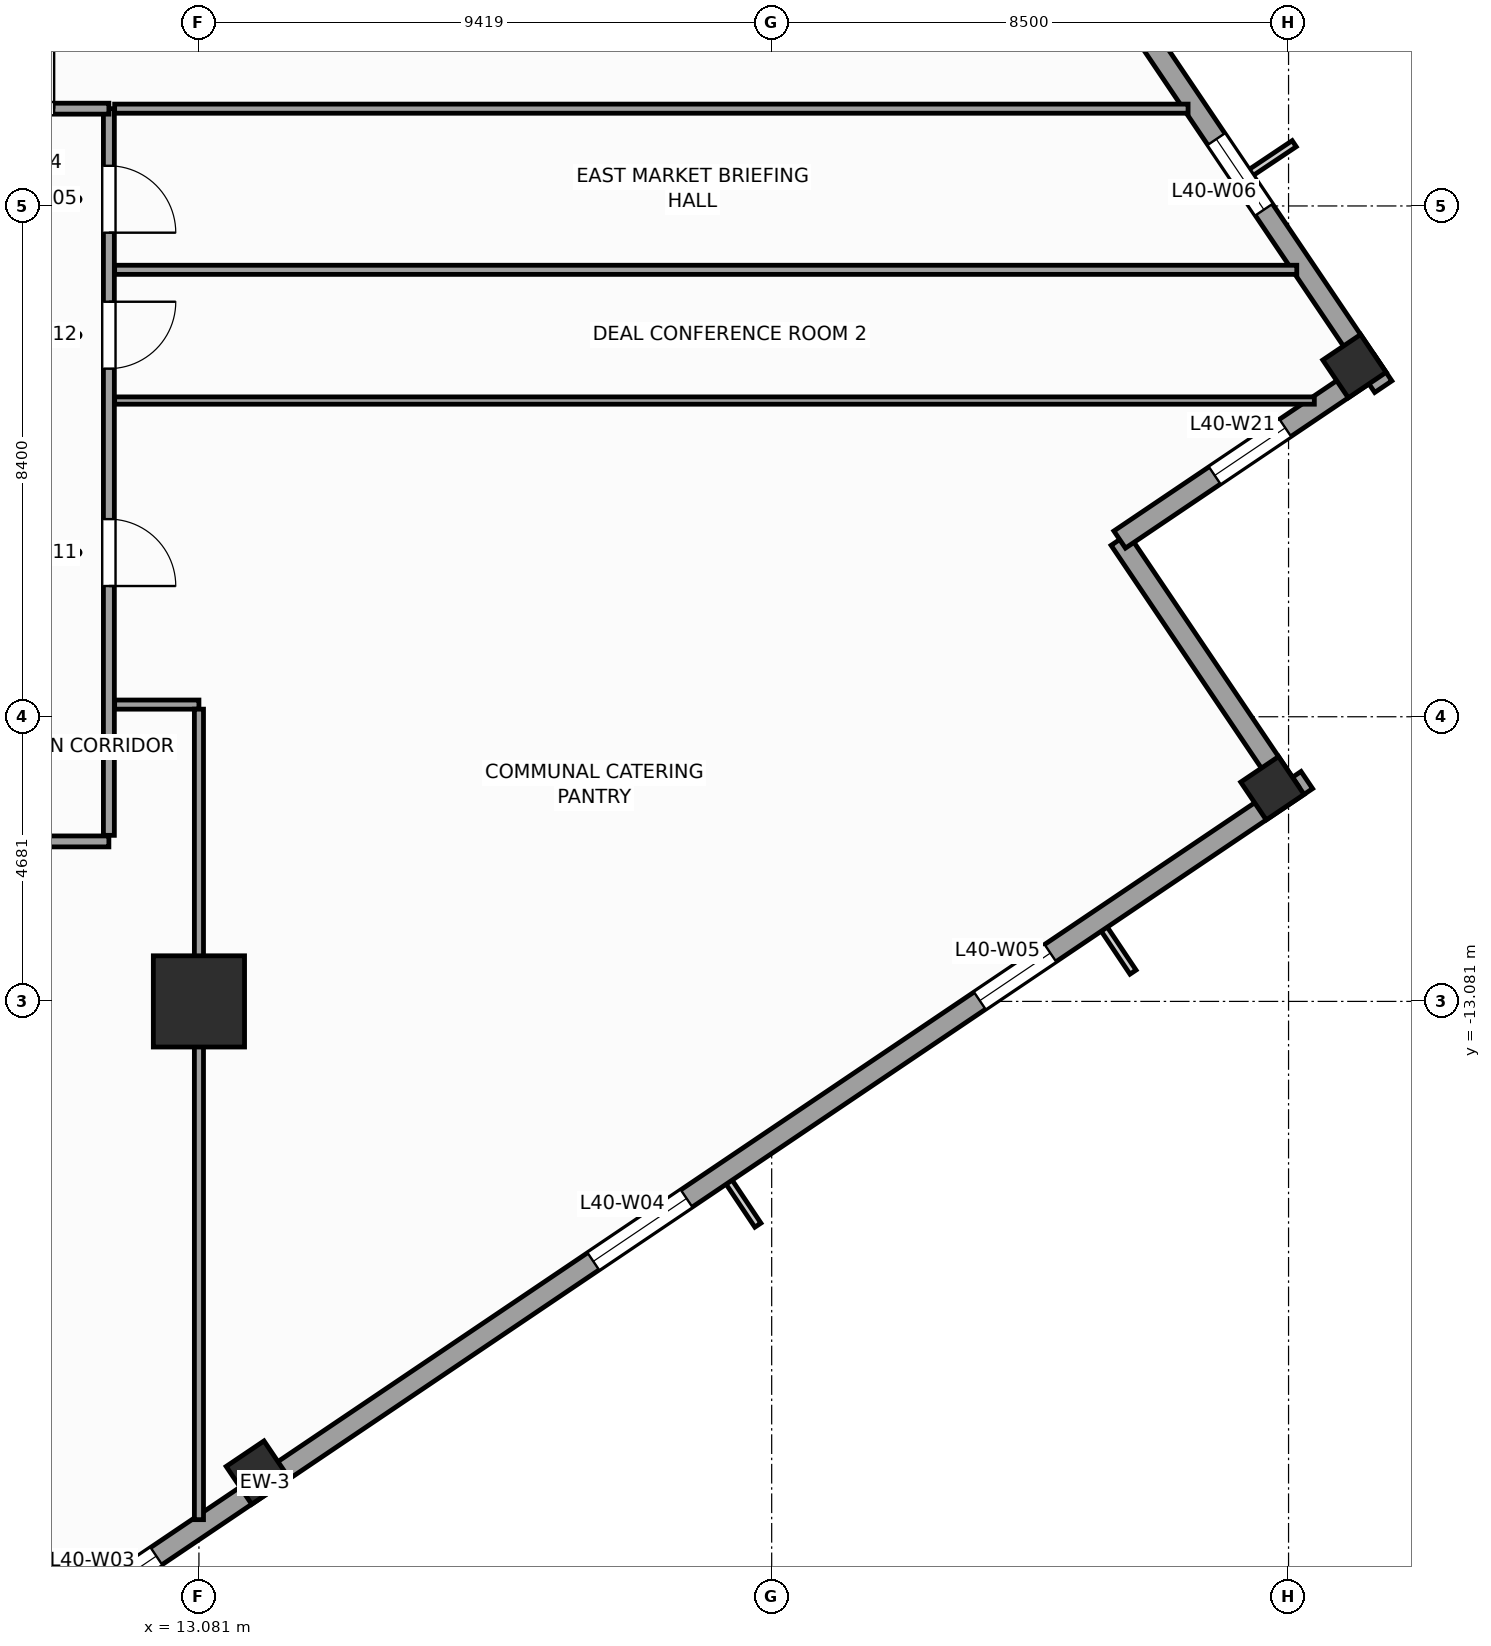
"""IFC4 building model, lengths in metres.
Left out: names, types, materials, properties, quantities, classifications, styles, units other than length and angle.
Written with IfcOpenShell. Run it as: python <this file> out.ifc"""

import sys

from ifc_helpers import new_model, si_unit, direction, frame, frame_2d, origin, origin_2d, place, context, subcontext, project, spatial, rectangle, extrude, source, transform, mapped, element, fill, save


model = new_model("IFC4")
c1 = context("Model", 3, precision=1e-05, world=origin(), true_north=direction((0.0, 1.0)))
c2 = subcontext(c1, "Body", "Model", "MODEL_VIEW")
j1 = project(units=[si_unit("LENGTHUNIT", "METRE"), si_unit("PLANEANGLEUNIT", "RADIAN")], contexts=[c1])
p1 = place(None, origin())
s1 = spatial("IfcSite", under=j1, at=p1, CompositionType="ELEMENT")
p2 = place(p1, origin())
s2 = spatial("IfcBuilding", under=s1, at=p2, CompositionType="ELEMENT")
p3 = place(p2, frame((0.0, 0.0, 168.4)))
s3 = spatial("IfcBuildingStorey", under=s2, at=p3, CompositionType="ELEMENT", Elevation=168.4)
m1 = source(origin(), c2, "Body", "SweptSolid", [
    extrude(rectangle(XDim=1.5, YDim=1.5, at=origin_2d()), origin(), (0.0, 0.0, 1.0), 4.0),
])
p4 = place(p3, frame((13.081, -13.081, 0.0), z_axis=(0.0, 0.0, 1.0), x_axis=(1.0, 0.0, 0.0)))
e1 = element("IfcColumn", 1, at=p4, inside=s3, PredefinedType="COLUMN", context=c2, shape_type="MappedRepresentation", body=[
    mapped(m1, transform((0.0, 0.0, 0.0), scale=1.0)),
])
m2 = source(origin(), c2, "Body", "SweptSolid", [
    extrude(rectangle(XDim=0.75, YDim=0.75, at=origin_2d()), origin(), (0.0, 0.0, 1.0), 4.0),
])
for number, where, z_axis, x_axis in (
    (2, (14.05, -20.83, 0.0), (0.0, 0.0, 1.0), (0.829, 0.559, 0.0)),
    (3, (30.734, -9.576, 0.0), (0.0, 0.0, 1.0), (0.829, 0.559, 0.0)),
    (4, (32.083, -2.635, 0.0), (0.0, 0.0, 1.0), (0.829, 0.559, 0.0)),
):
    element("IfcColumn", number, at=place(p3, frame(where, z_axis=z_axis, x_axis=x_axis)), inside=s3, PredefinedType="COLUMN", context=c2, shape_type="MappedRepresentation", body=[
        mapped(m2, transform((0.0, 0.0, 0.0), scale=1.0)),
    ])
p5 = place(p3, frame((-2.972, -32.558, 0.0), z_axis=(0.0, 0.0, 1.0), x_axis=(0.829036218961, 0.559194910251, 0.0)))
e5 = element("IfcWall", 5, at=p5, inside=s3, PredefinedType="STANDARD", context=c2, shape_type="SweptSolid", body=[
    extrude(rectangle(XDim=41.34, YDim=0.34, at=frame_2d((20.67, 0.0))), origin(), (0.0, 0.0, 1.0), 3.04),
])
p6 = place(p5, frame((4.261, 0.0, 0.56)))
e6 = element("IfcOpeningElement", 6, at=p6, cuts=e5, PredefinedType="OPENING", context=c2, shape_type="SweptSolid", body=[
    extrude(rectangle(XDim=1.4, YDim=2.4, at=frame_2d((0.7, 1.2))), frame((0.0, 0.18, 0.0), z_axis=(0.0, -1.0, 0.0), x_axis=(1.0, 0.0, 0.0)), (0.0, 0.0, 1.0), 0.36),
])
p7 = place(p5, frame((11.064, 0.0, 0.61)))
e7 = element("IfcOpeningElement", 7, at=p7, cuts=e5, PredefinedType="OPENING", context=c2, shape_type="SweptSolid", body=[
    extrude(rectangle(XDim=1.85, YDim=2.35, at=frame_2d((0.925, 1.175))), frame((0.0, 0.18, 0.0), z_axis=(0.0, -1.0, 0.0), x_axis=(1.0, 0.0, 0.0)), (0.0, 0.0, 1.0), 0.36),
])
p8 = place(p5, frame((16.668, 0.0, 0.61)))
e8 = element("IfcOpeningElement", 8, at=p8, cuts=e5, PredefinedType="OPENING", context=c2, shape_type="SweptSolid", body=[
    extrude(rectangle(XDim=1.85, YDim=2.35, at=frame_2d((0.925, 1.175))), frame((0.0, 0.18, 0.0), z_axis=(0.0, -1.0, 0.0), x_axis=(1.0, 0.0, 0.0)), (0.0, 0.0, 1.0), 0.36),
])
p9 = place(p5, frame((27.186, 0.0, 0.61)))
e9 = element("IfcOpeningElement", 9, at=p9, cuts=e5, PredefinedType="OPENING", context=c2, shape_type="SweptSolid", body=[
    extrude(rectangle(XDim=1.85, YDim=2.35, at=frame_2d((0.925, 1.175))), frame((0.0, 0.18, 0.0), z_axis=(0.0, -1.0, 0.0), x_axis=(1.0, 0.0, 0.0)), (0.0, 0.0, 1.0), 0.36),
])
p10 = place(p5, frame((34.852, 0.0, 0.56)))
e10 = element("IfcOpeningElement", 10, at=p10, cuts=e5, PredefinedType="OPENING", context=c2, shape_type="SweptSolid", body=[
    extrude(rectangle(XDim=1.4, YDim=2.4, at=frame_2d((0.7, 1.2))), frame((0.0, 0.18, 0.0), z_axis=(0.0, -1.0, 0.0), x_axis=(1.0, 0.0, 0.0)), (0.0, 0.0, 1.0), 0.36),
])
p11 = place(p3, frame((31.019, -9.631, 0.0), z_axis=(0.0, 0.0, 1.0), x_axis=(-0.559210350234, 0.829025804298, 0.0)))
e11 = element("IfcWall", 11, at=p11, inside=s3, PredefinedType="STANDARD", context=c2, shape_type="SweptSolid", body=[
    extrude(rectangle(XDim=5.0, YDim=0.34, at=frame_2d((2.5, 0.0))), origin(), (0.0, 0.0, 1.0), 3.74),
])
p12 = place(p3, frame((28.223, -5.486, 0.0), z_axis=(0.0, 0.0, 1.0), x_axis=(0.82905227345, 0.559171107879, 0.0)))
e12 = element("IfcWall", 12, at=p12, inside=s3, PredefinedType="STANDARD", context=c2, shape_type="SweptSolid", body=[
    extrude(rectangle(XDim=5.17, YDim=0.34, at=frame_2d((2.585, 0.0))), origin(), (0.0, 0.0, 1.0), 3.04),
])
p13 = place(p12, frame((1.885, 0.0, 0.56)))
e13 = element("IfcOpeningElement", 13, at=p13, cuts=e12, PredefinedType="OPENING", context=c2, shape_type="SweptSolid", body=[
    extrude(rectangle(XDim=1.4, YDim=2.4, at=frame_2d((0.7, 1.2))), frame((0.0, 0.18, 0.0), z_axis=(0.0, -1.0, 0.0), x_axis=(1.0, 0.0, 0.0)), (0.0, 0.0, 1.0), 0.36),
])
p14 = place(p3, frame((32.558, -2.972, 0.0), z_axis=(0.0, 0.0, 1.0), x_axis=(-0.559194910251, 0.829036218961, 0.0)))
e14 = element("IfcWall", 14, at=p14, inside=s3, PredefinedType="STANDARD", context=c2, shape_type="SweptSolid", body=[
    extrude(rectangle(XDim=41.34, YDim=0.34, at=frame_2d((20.67, 0.0))), origin(), (0.0, 0.0, 1.0), 3.04),
])
p15 = place(p14, frame((25.745, 0.0, 0.0)))
e15 = element("IfcOpeningElement", 15, at=p15, cuts=e14, PredefinedType="OPENING", context=c2, shape_type="SweptSolid", body=[
    extrude(rectangle(XDim=1.05, YDim=2.25, at=frame_2d((0.525, 1.125))), frame((0.0, 0.18, 0.0), z_axis=(0.0, -1.0, 0.0), x_axis=(1.0, 0.0, 0.0)), (0.0, 0.0, 1.0), 0.36),
])
p16 = place(p14, frame((3.511, 0.0, 0.56)))
e16 = element("IfcOpeningElement", 16, at=p16, cuts=e14, PredefinedType="OPENING", context=c2, shape_type="SweptSolid", body=[
    extrude(rectangle(XDim=1.4, YDim=2.4, at=frame_2d((0.7, 1.2))), frame((0.0, 0.18, 0.0), z_axis=(0.0, -1.0, 0.0), x_axis=(1.0, 0.0, 0.0)), (0.0, 0.0, 1.0), 0.36),
])
p17 = place(p14, frame((11.064, 0.0, 0.61)))
e17 = element("IfcOpeningElement", 17, at=p17, cuts=e14, PredefinedType="OPENING", context=c2, shape_type="SweptSolid", body=[
    extrude(rectangle(XDim=1.85, YDim=2.35, at=frame_2d((0.925, 1.175))), frame((0.0, 0.18, 0.0), z_axis=(0.0, -1.0, 0.0), x_axis=(1.0, 0.0, 0.0)), (0.0, 0.0, 1.0), 0.36),
])
p18 = place(p14, frame((18.168, 0.0, 0.61)))
e18 = element("IfcOpeningElement", 18, at=p18, cuts=e14, PredefinedType="OPENING", context=c2, shape_type="SweptSolid", body=[
    extrude(rectangle(XDim=1.85, YDim=2.35, at=frame_2d((0.925, 1.175))), frame((0.0, 0.18, 0.0), z_axis=(0.0, -1.0, 0.0), x_axis=(1.0, 0.0, 0.0)), (0.0, 0.0, 1.0), 0.36),
])
p19 = place(p14, frame((27.936, 0.0, 0.61)))
e19 = element("IfcOpeningElement", 19, at=p19, cuts=e14, PredefinedType="OPENING", context=c2, shape_type="SweptSolid", body=[
    extrude(rectangle(XDim=1.85, YDim=2.35, at=frame_2d((0.925, 1.175))), frame((0.0, 0.18, 0.0), z_axis=(0.0, -1.0, 0.0), x_axis=(1.0, 0.0, 0.0)), (0.0, 0.0, 1.0), 0.36),
])
p20 = place(p14, frame((34.852, 0.0, 0.56)))
e20 = element("IfcOpeningElement", 20, at=p20, cuts=e14, PredefinedType="OPENING", context=c2, shape_type="SweptSolid", body=[
    extrude(rectangle(XDim=1.4, YDim=2.4, at=frame_2d((0.7, 1.2))), frame((0.0, 0.18, 0.0), z_axis=(0.0, -1.0, 0.0), x_axis=(1.0, 0.0, 0.0)), (0.0, 0.0, 1.0), 0.36),
])
p21 = place(p3, frame((-10.45, -10.45, 0.0), z_axis=(0.0, 0.0, 1.0), x_axis=(1.0, 0.0, 0.0)))
e21 = element("IfcWall", 21, at=p21, inside=s3, PredefinedType="PARTITIONING", context=c2, shape_type="SweptSolid", body=[
    extrude(rectangle(XDim=22.05, YDim=0.18, at=frame_2d((11.025, 0.0))), origin(), (0.0, 0.0, 1.0), 3.74),
])
p22 = place(p21, frame((15.086, 0.0, 0.0)))
e22 = element("IfcOpeningElement", 22, at=p22, cuts=e21, PredefinedType="OPENING", context=c2, shape_type="SweptSolid", body=[
    extrude(rectangle(XDim=0.95, YDim=2.1, at=frame_2d((0.475, 1.05))), frame((0.0, 0.1, 0.0), z_axis=(0.0, -1.0, 0.0), x_axis=(1.0, 0.0, 0.0)), (0.0, 0.0, 1.0), 0.2),
])
p23 = place(p21, frame((7.611, 0.0, 0.0)))
e23 = element("IfcOpeningElement", 23, at=p23, cuts=e21, PredefinedType="OPENING", context=c2, shape_type="SweptSolid", body=[
    extrude(rectangle(XDim=0.95, YDim=2.1, at=frame_2d((0.475, 1.05))), frame((0.0, 0.1, 0.0), z_axis=(0.0, -1.0, 0.0), x_axis=(1.0, 0.0, 0.0)), (0.0, 0.0, 1.0), 0.2),
])
p24 = place(p21, frame((2.939, 0.0, 0.0)))
e24 = element("IfcOpeningElement", 24, at=p24, cuts=e21, PredefinedType="OPENING", context=c2, shape_type="SweptSolid", body=[
    extrude(rectangle(XDim=1.1, YDim=2.2, at=frame_2d((0.55, 1.1))), frame((0.0, 0.1, 0.0), z_axis=(0.0, -1.0, 0.0), x_axis=(1.0, 0.0, 0.0)), (0.0, 0.0, 1.0), 0.2),
])
p25 = place(p21, frame((11.175, 0.0, 0.0)))
e25 = element("IfcOpeningElement", 25, at=p25, cuts=e21, PredefinedType="OPENING", context=c2, shape_type="SweptSolid", body=[
    extrude(rectangle(XDim=1.1, YDim=2.2, at=frame_2d((0.55, 1.1))), frame((0.0, 0.1, 0.0), z_axis=(0.0, -1.0, 0.0), x_axis=(1.0, 0.0, 0.0)), (0.0, 0.0, 1.0), 0.2),
])
p26 = place(p21, frame((18.805, 0.0, 0.0)))
e26 = element("IfcOpeningElement", 26, at=p26, cuts=e21, PredefinedType="OPENING", context=c2, shape_type="SweptSolid", body=[
    extrude(rectangle(XDim=1.1, YDim=2.2, at=frame_2d((0.55, 1.1))), frame((0.0, 0.1, 0.0), z_axis=(0.0, -1.0, 0.0), x_axis=(1.0, 0.0, 0.0)), (0.0, 0.0, 1.0), 0.2),
])
p27 = place(p3, frame((11.6, -10.35, 0.0), z_axis=(0.0, 0.0, 1.0), x_axis=(0.0, 1.0, 0.0)))
e27 = element("IfcWall", 27, at=p27, inside=s3, PredefinedType="PARTITIONING", context=c2, shape_type="SweptSolid", body=[
    extrude(rectangle(XDim=11.95, YDim=0.18, at=frame_2d((5.975, 0.0))), origin(), (0.0, 0.0, 1.0), 3.74),
])
p28 = place(p27, frame((9.911, 0.0, 0.0)))
e28 = element("IfcOpeningElement", 28, at=p28, cuts=e27, PredefinedType="OPENING", context=c2, shape_type="SweptSolid", body=[
    extrude(rectangle(XDim=1.1, YDim=2.2, at=frame_2d((0.55, 1.1))), frame((0.0, 0.1, 0.0), z_axis=(0.0, -1.0, 0.0), x_axis=(1.0, 0.0, 0.0)), (0.0, 0.0, 1.0), 0.2),
])
p29 = place(p27, frame((4.1, 0.0, 0.0)))
e29 = element("IfcOpeningElement", 29, at=p29, cuts=e27, PredefinedType="OPENING", context=c2, shape_type="SweptSolid", body=[
    extrude(rectangle(XDim=1.1, YDim=2.2, at=frame_2d((0.55, 1.1))), frame((0.0, 0.1, 0.0), z_axis=(0.0, -1.0, 0.0), x_axis=(1.0, 0.0, 0.0)), (0.0, 0.0, 1.0), 0.2),
])
p30 = place(p27, frame((7.675, 0.0, 0.0)))
e30 = element("IfcOpeningElement", 30, at=p30, cuts=e27, PredefinedType="OPENING", context=c2, shape_type="SweptSolid", body=[
    extrude(rectangle(XDim=1.1, YDim=2.2, at=frame_2d((0.55, 1.1))), frame((0.0, 0.1, 0.0), z_axis=(0.0, -1.0, 0.0), x_axis=(1.0, 0.0, 0.0)), (0.0, 0.0, 1.0), 0.2),
])
p31 = place(p3, frame((8.7, 1.6, 0.0), z_axis=(0.0, 0.0, 1.0), x_axis=(1.0, 0.0, 0.0)))
e31 = element("IfcWall", 31, at=p31, inside=s3, PredefinedType="PARTITIONING", context=c2, shape_type="SweptSolid", body=[
    extrude(rectangle(XDim=2.9, YDim=0.18, at=frame_2d((1.45, 0.0))), origin(), (0.0, 0.0, 1.0), 3.74),
])
p32 = place(p31, frame((0.9, 0.0, 0.0)))
e32 = element("IfcOpeningElement", 32, at=p32, cuts=e31, PredefinedType="OPENING", context=c2, shape_type="SweptSolid", body=[
    extrude(rectangle(XDim=1.1, YDim=2.2, at=frame_2d((0.55, 1.1))), frame((0.0, 0.1, 0.0), z_axis=(0.0, -1.0, 0.0), x_axis=(1.0, 0.0, 0.0)), (0.0, 0.0, 1.0), 0.2),
])
p33 = place(p3, frame((11.695, -1.05, 0.0), z_axis=(0.0, 0.0, 1.0), x_axis=(1.0, 0.0, 0.0)))
e33 = element("IfcWall", 33, at=p33, inside=s3, PredefinedType="PARTITIONING", context=c2, shape_type="SweptSolid", body=[
    extrude(rectangle(XDim=19.44, YDim=0.15, at=frame_2d((9.72, 0.0))), origin(), (0.0, 0.0, 1.0), 3.74),
])
p34 = place(p3, frame((11.695, 1.6, 0.0), z_axis=(0.0, 0.0, 1.0), x_axis=(1.0, 0.0, 0.0)))
e34 = element("IfcWall", 34, at=p34, inside=s3, PredefinedType="PARTITIONING", context=c2, shape_type="SweptSolid", body=[
    extrude(rectangle(XDim=17.653, YDim=0.15, at=frame_2d((8.826, 0.0))), origin(), (0.0, 0.0, 1.0), 3.74),
])
p35 = place(p3, frame((11.695, -8.2, 0.0), z_axis=(0.0, 0.0, 1.0), x_axis=(1.0, 0.0, 0.0)))
e35 = element("IfcWall", 35, at=p35, inside=s3, PredefinedType="PARTITIONING", context=c2, shape_type="SweptSolid", body=[
    extrude(rectangle(XDim=1.386, YDim=0.15, at=frame_2d((0.693, 0.0))), origin(), (0.0, 0.0, 1.0), 3.74),
])
p36 = place(p3, frame((13.081, -8.275, 0.0), z_axis=(0.0, 0.0, 1.0), x_axis=(0.0, -1.0, 0.0)))
e36 = element("IfcWall", 36, at=p36, inside=s3, PredefinedType="PARTITIONING", context=c2, shape_type="SweptSolid", body=[
    extrude(rectangle(XDim=13.329, YDim=0.15, at=frame_2d((6.664, 0.0))), origin(), (0.0, 0.0, 1.0), 2.84),
])
p37 = place(p3, frame((11.695, -3.2, 0.0), z_axis=(0.0, 0.0, 1.0), x_axis=(1.0, 0.0, 0.0)))
e37 = element("IfcWall", 37, at=p37, inside=s3, PredefinedType="PARTITIONING", context=c2, shape_type="SweptSolid", body=[
    extrude(rectangle(XDim=19.729, YDim=0.12, at=frame_2d((9.865, 0.0))), origin(), (0.0, 0.0, 1.0), 3.74),
])
m3 = source(origin(), c2, "Body", "SweptSolid", [
    extrude(rectangle(XDim=1.85, YDim=2.35, at=frame_2d((0.925, 1.175))), frame((0.0, 0.03, 0.0), z_axis=(0.0, -1.0, 0.0), x_axis=(1.0, 0.0, 0.0)), (0.0, 0.0, 1.0), 0.06),
])
p38 = place(p8, origin())
e38 = element("IfcWindow", 38, at=p38, inside=s3, PartitioningType="SINGLE_PANEL", PredefinedType="WINDOW", context=c2, shape_type="MappedRepresentation", body=[
    mapped(m3, transform((0.0, 0.0, 0.0), scale=1.0)),
])
fill(e8, e38)
p39 = place(p9, origin())
e39 = element("IfcWindow", 39, at=p39, inside=s3, PartitioningType="SINGLE_PANEL", PredefinedType="WINDOW", context=c2, shape_type="MappedRepresentation", body=[
    mapped(m3, transform((0.0, 0.0, 0.0), scale=1.0)),
])
fill(e9, e39)
m4 = source(origin(), c2, "Body", "SweptSolid", [
    extrude(rectangle(XDim=1.4, YDim=2.4, at=frame_2d((0.7, 1.2))), frame((0.0, 0.03, 0.0), z_axis=(0.0, -1.0, 0.0), x_axis=(1.0, 0.0, 0.0)), (0.0, 0.0, 1.0), 0.06),
])
p40 = place(p10, origin())
e40 = element("IfcWindow", 40, at=p40, inside=s3, PartitioningType="SINGLE_PANEL", PredefinedType="WINDOW", context=c2, shape_type="MappedRepresentation", body=[
    mapped(m4, transform((0.0, 0.0, 0.0), scale=1.0)),
])
fill(e10, e40)
p41 = place(p16, origin())
e41 = element("IfcWindow", 41, at=p41, inside=s3, PartitioningType="SINGLE_PANEL", PredefinedType="WINDOW", context=c2, shape_type="MappedRepresentation", body=[
    mapped(m4, transform((0.0, 0.0, 0.0), scale=1.0)),
])
fill(e16, e41)
p42 = place(p13, origin())
e42 = element("IfcWindow", 42, at=p42, inside=s3, PartitioningType="SINGLE_PANEL", PredefinedType="WINDOW", context=c2, shape_type="MappedRepresentation", body=[
    mapped(m4, transform((0.0, 0.0, 0.0), scale=1.0)),
])
fill(e13, e42)
m5 = source(origin(), c2, "Body", "SweptSolid", [
    extrude(rectangle(XDim=1.1, YDim=2.2, at=frame_2d((0.55, 1.1))), frame((0.0, 0.025, 0.0), z_axis=(0.0, -1.0, 0.0), x_axis=(1.0, 0.0, 0.0)), (0.0, 0.0, 1.0), 0.05),
])
p43 = place(p32, origin())
e43 = element("IfcDoor", 43, at=p43, inside=s3, OperationType="SINGLE_SWING_RIGHT", PredefinedType="DOOR", context=c2, shape_type="MappedRepresentation", body=[
    mapped(m5, transform((0.0, 0.0, 0.0), scale=1.0)),
])
fill(e32, e43)
p44 = place(p28, frame((1.1, 0.0, 0.0), z_axis=(0.0, 0.0, 1.0), x_axis=(-1.0, 0.0, 0.0)))
e44 = element("IfcDoor", 44, at=p44, inside=s3, OperationType="SINGLE_SWING_LEFT", PredefinedType="DOOR", context=c2, shape_type="MappedRepresentation", body=[
    mapped(m5, transform((0.0, 0.0, 0.0), scale=1.0)),
])
fill(e28, e44)
p45 = place(p29, frame((1.1, 0.0, 0.0), z_axis=(0.0, 0.0, 1.0), x_axis=(-1.0, 0.0, 0.0)))
e45 = element("IfcDoor", 45, at=p45, inside=s3, OperationType="SINGLE_SWING_LEFT", PredefinedType="DOOR", context=c2, shape_type="MappedRepresentation", body=[
    mapped(m5, transform((0.0, 0.0, 0.0), scale=1.0)),
])
fill(e29, e45)
p46 = place(p30, frame((1.1, 0.0, 0.0), z_axis=(0.0, 0.0, 1.0), x_axis=(-1.0, 0.0, 0.0)))
e46 = element("IfcDoor", 46, at=p46, inside=s3, OperationType="SINGLE_SWING_RIGHT", PredefinedType="DOOR", context=c2, shape_type="MappedRepresentation", body=[
    mapped(m5, transform((0.0, 0.0, 0.0), scale=1.0)),
])
fill(e30, e46)
save(model, sys.argv[1])
